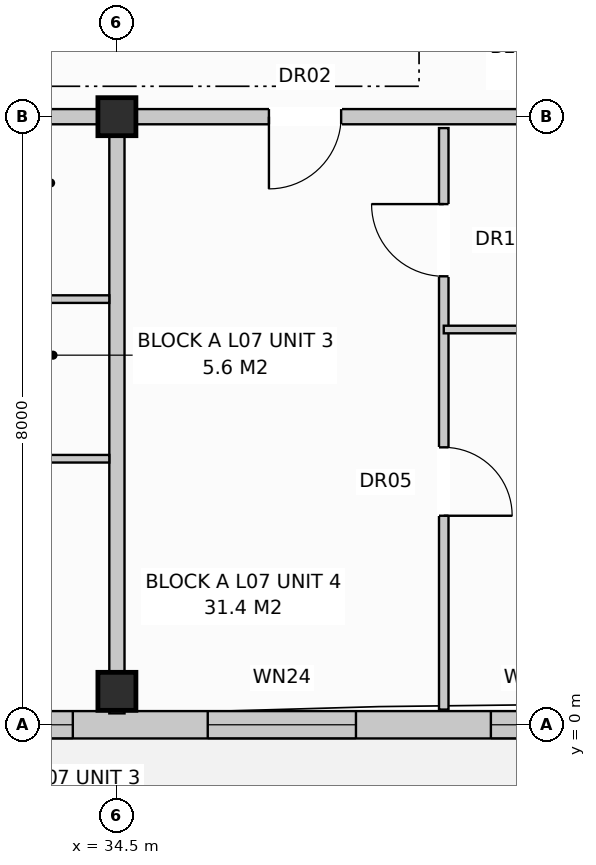
"""IFC4 building model, lengths in metres.
Left out: names, types, materials, properties, quantities, classifications, styles, units other than length and angle.
Written with IfcOpenShell. Run it as: python <this file> out.ifc"""

import sys

from ifc_helpers import new_model, si_unit, direction, frame, frame_2d, origin, origin_with_axes, origin_2d, place, context, subcontext, project, spatial, rectangle, extrude, element, fill, save


model = new_model("IFC4")
c1 = context("Model", 3, precision=1e-05, world=origin(), true_north=direction((0.0, 1.0)))
c2 = subcontext(c1, "Body", "Model", "MODEL_VIEW")
j1 = project(units=[si_unit("LENGTHUNIT", "METRE"), si_unit("PLANEANGLEUNIT", "RADIAN")], contexts=[c1])
p1 = place(None, origin())
s1 = spatial("IfcSite", under=j1, at=p1, CompositionType="ELEMENT")
p2 = place(p1, origin())
s2 = spatial("IfcBuilding", under=s1, at=p2, CompositionType="ELEMENT")
p3 = place(p2, frame((0.0, 0.0, 24.0)))
s3 = spatial("IfcBuildingStorey", under=s2, at=p3, CompositionType="ELEMENT", Elevation=24.0)
for number, where, z_axis, x_axis in (
    (1, (34.5, 0.44, 0.0), (0.0, 0.0, 1.0), (1.0, 0.0, 0.0)),
    (2, (34.5, 8.0, 0.0), (0.0, 0.0, 1.0), (1.0, 0.0, 0.0)),
):
    element("IfcColumn", number, at=place(p3, frame(where, z_axis=z_axis, x_axis=x_axis)), inside=s3, PredefinedType="COLUMN", context=c2, shape_type="SweptSolid", body=[
        extrude(rectangle(XDim=0.5, YDim=0.5, at=origin_2d()), origin(), (0.0, 0.0, 1.0), 3.2),
    ])
p4 = place(p3, frame((0.17, 0.0, 0.0), z_axis=(0.0, 0.0, 1.0), x_axis=(1.0, 0.0, 0.0)))
e3 = element("IfcWall", 3, at=p4, inside=s3, PredefinedType="STANDARD", context=c2, shape_type="SweptSolid", body=[
    extrude(rectangle(XDim=54.86, YDim=0.36, at=frame_2d((27.43, 0.0))), origin(), (0.0, 0.0, 1.0), 2.95),
])
p5 = place(p4, frame((2.5, 0.0, 0.0)))
e4 = element("IfcOpeningElement", 4, at=p5, cuts=e3, PredefinedType="OPENING", context=c2, shape_type="SweptSolid", body=[
    extrude(rectangle(XDim=0.95, YDim=2.1, at=frame_2d((0.475, 1.05))), frame((0.0, 0.192, 0.0), z_axis=(0.0, -1.0, 0.0), x_axis=(1.0, 0.0, 0.0)), (0.0, 0.0, 1.0), 0.384),
])
p6 = place(p4, frame((17.0, 0.0, 0.0)))
e5 = element("IfcOpeningElement", 5, at=p6, cuts=e3, PredefinedType="OPENING", context=c2, shape_type="SweptSolid", body=[
    extrude(rectangle(XDim=0.95, YDim=2.1, at=frame_2d((0.475, 1.05))), frame((0.0, 0.192, 0.0), z_axis=(0.0, -1.0, 0.0), x_axis=(1.0, 0.0, 0.0)), (0.0, 0.0, 1.0), 0.384),
])
p7 = place(p4, frame((30.1, 0.0, 0.0)))
e6 = element("IfcOpeningElement", 6, at=p7, cuts=e3, PredefinedType="OPENING", context=c2, shape_type="SweptSolid", body=[
    extrude(rectangle(XDim=0.95, YDim=2.1, at=frame_2d((0.475, 1.05))), frame((0.0, 0.192, 0.0), z_axis=(0.0, -1.0, 0.0), x_axis=(1.0, 0.0, 0.0)), (0.0, 0.0, 1.0), 0.384),
])
p8 = place(p4, frame((46.5, 0.0, 0.0)))
e7 = element("IfcOpeningElement", 7, at=p8, cuts=e3, PredefinedType="OPENING", context=c2, shape_type="SweptSolid", body=[
    extrude(rectangle(XDim=0.95, YDim=2.1, at=frame_2d((0.475, 1.05))), frame((0.0, 0.192, 0.0), z_axis=(0.0, -1.0, 0.0), x_axis=(1.0, 0.0, 0.0)), (0.0, 0.0, 1.0), 0.384),
])
p9 = place(p4, frame((0.75, 0.0, 0.72)))
e8 = element("IfcOpeningElement", 8, at=p9, cuts=e3, PredefinedType="OPENING", context=c2, shape_type="SweptSolid", body=[
    extrude(rectangle(XDim=1.1, YDim=1.5, at=frame_2d((0.55, 0.75))), frame((0.0, 0.192, 0.0), z_axis=(0.0, -1.0, 0.0), x_axis=(1.0, 0.0, 0.0)), (0.0, 0.0, 1.0), 0.384),
])
p10 = place(p4, frame((4.25, 0.0, 0.72)))
e9 = element("IfcOpeningElement", 9, at=p10, cuts=e3, PredefinedType="OPENING", context=c2, shape_type="SweptSolid", body=[
    extrude(rectangle(XDim=1.9, YDim=1.85, at=frame_2d((0.95, 0.925))), frame((0.0, 0.192, 0.0), z_axis=(0.0, -1.0, 0.0), x_axis=(1.0, 0.0, 0.0)), (0.0, 0.0, 1.0), 0.384),
])
p11 = place(p4, frame((8.925, 0.0, 0.8)))
e10 = element("IfcOpeningElement", 10, at=p11, cuts=e3, PredefinedType="OPENING", context=c2, shape_type="SweptSolid", body=[
    extrude(rectangle(XDim=1.95, YDim=1.65, at=frame_2d((0.975, 0.825))), frame((0.0, 0.192, 0.0), z_axis=(0.0, -1.0, 0.0), x_axis=(1.0, 0.0, 0.0)), (0.0, 0.0, 1.0), 0.384),
])
p12 = place(p4, frame((15.05, 0.0, 0.72)))
e11 = element("IfcOpeningElement", 11, at=p12, cuts=e3, PredefinedType="OPENING", context=c2, shape_type="SweptSolid", body=[
    extrude(rectangle(XDim=1.1, YDim=1.5, at=frame_2d((0.55, 0.75))), frame((0.0, 0.192, 0.0), z_axis=(0.0, -1.0, 0.0), x_axis=(1.0, 0.0, 0.0)), (0.0, 0.0, 1.0), 0.384),
])
p13 = place(p4, frame((21.05, 0.0, 0.72)))
e12 = element("IfcOpeningElement", 12, at=p13, cuts=e3, PredefinedType="OPENING", context=c2, shape_type="SweptSolid", body=[
    extrude(rectangle(XDim=1.9, YDim=1.85, at=frame_2d((0.95, 0.925))), frame((0.0, 0.192, 0.0), z_axis=(0.0, -1.0, 0.0), x_axis=(1.0, 0.0, 0.0)), (0.0, 0.0, 1.0), 0.384),
])
p14 = place(p4, frame((24.85, 0.0, 0.72)))
e13 = element("IfcOpeningElement", 13, at=p14, cuts=e3, PredefinedType="OPENING", context=c2, shape_type="SweptSolid", body=[
    extrude(rectangle(XDim=1.1, YDim=1.5, at=frame_2d((0.55, 0.75))), frame((0.0, 0.192, 0.0), z_axis=(0.0, -1.0, 0.0), x_axis=(1.0, 0.0, 0.0)), (0.0, 0.0, 1.0), 0.384),
])
p15 = place(p4, frame((28.35, 0.0, 0.72)))
e14 = element("IfcOpeningElement", 14, at=p15, cuts=e3, PredefinedType="OPENING", context=c2, shape_type="SweptSolid", body=[
    extrude(rectangle(XDim=1.1, YDim=1.5, at=frame_2d((0.55, 0.75))), frame((0.0, 0.192, 0.0), z_axis=(0.0, -1.0, 0.0), x_axis=(1.0, 0.0, 0.0)), (0.0, 0.0, 1.0), 0.384),
])
p16 = place(p4, frame((31.85, 0.0, 0.72)))
e15 = element("IfcOpeningElement", 15, at=p16, cuts=e3, PredefinedType="OPENING", context=c2, shape_type="SweptSolid", body=[
    extrude(rectangle(XDim=1.9, YDim=1.85, at=frame_2d((0.95, 0.925))), frame((0.0, 0.192, 0.0), z_axis=(0.0, -1.0, 0.0), x_axis=(1.0, 0.0, 0.0)), (0.0, 0.0, 1.0), 0.384),
])
p17 = place(p4, frame((35.525, 0.0, 0.8)))
e16 = element("IfcOpeningElement", 16, at=p17, cuts=e3, PredefinedType="OPENING", context=c2, shape_type="SweptSolid", body=[
    extrude(rectangle(XDim=1.95, YDim=1.65, at=frame_2d((0.975, 0.825))), frame((0.0, 0.192, 0.0), z_axis=(0.0, -1.0, 0.0), x_axis=(1.0, 0.0, 0.0)), (0.0, 0.0, 1.0), 0.384),
])
p18 = place(p4, frame((39.25, 0.0, 0.72)))
e17 = element("IfcOpeningElement", 17, at=p18, cuts=e3, PredefinedType="OPENING", context=c2, shape_type="SweptSolid", body=[
    extrude(rectangle(XDim=1.1, YDim=1.5, at=frame_2d((0.55, 0.75))), frame((0.0, 0.192, 0.0), z_axis=(0.0, -1.0, 0.0), x_axis=(1.0, 0.0, 0.0)), (0.0, 0.0, 1.0), 0.384),
])
p19 = place(p4, frame((42.45, 0.0, 0.8)))
e18 = element("IfcOpeningElement", 18, at=p19, cuts=e3, PredefinedType="OPENING", context=c2, shape_type="SweptSolid", body=[
    extrude(rectangle(XDim=1.9, YDim=1.85, at=frame_2d((0.95, 0.925))), frame((0.0, 0.192, 0.0), z_axis=(0.0, -1.0, 0.0), x_axis=(1.0, 0.0, 0.0)), (0.0, 0.0, 1.0), 0.384),
])
p20 = place(p4, frame((48.7, 0.0, 0.9)))
e19 = element("IfcOpeningElement", 19, at=p20, cuts=e3, PredefinedType="OPENING", context=c2, shape_type="SweptSolid", body=[
    extrude(rectangle(XDim=0.95, YDim=1.55, at=frame_2d((0.475, 0.775))), frame((0.0, 0.192, 0.0), z_axis=(0.0, -1.0, 0.0), x_axis=(1.0, 0.0, 0.0)), (0.0, 0.0, 1.0), 0.384),
])
p21 = place(p4, frame((51.5, 0.0, 0.8)))
e20 = element("IfcOpeningElement", 20, at=p21, cuts=e3, PredefinedType="OPENING", context=c2, shape_type="SweptSolid", body=[
    extrude(rectangle(XDim=1.8, YDim=1.7, at=frame_2d((0.9, 0.85))), frame((0.0, 0.192, 0.0), z_axis=(0.0, -1.0, 0.0), x_axis=(1.0, 0.0, 0.0)), (0.0, 0.0, 1.0), 0.384),
])
p22 = place(p3, frame((34.5, 7.85, 0.0), z_axis=(0.0, 0.0, 1.0), x_axis=(0.0, -1.0, 0.0)))
e21 = element("IfcWall", 21, at=p22, inside=s3, PredefinedType="PARTITIONING", context=c2, shape_type="SweptSolid", body=[
    extrude(rectangle(XDim=7.7, YDim=0.2, at=frame_2d((3.85, 0.0))), origin(), (0.0, 0.0, 1.0), 2.95),
])
p23 = place(p3, frame((27.6, 8.0, 0.0), z_axis=(0.0, 0.0, 1.0), x_axis=(1.0, 0.0, 0.0)))
e22 = element("IfcWall", 22, at=p23, inside=s3, PredefinedType="PARTITIONING", context=c2, shape_type="SweptSolid", body=[
    extrude(rectangle(XDim=6.9, YDim=0.2, at=frame_2d((3.45, 0.0))), origin(), (0.0, 0.0, 1.0), 2.39),
])
p24 = place(p23, frame((2.0, 0.0, 0.0)))
e23 = element("IfcOpeningElement", 23, at=p24, cuts=e22, PredefinedType="OPENING", context=c2, shape_type="SweptSolid", body=[
    extrude(rectangle(XDim=0.95, YDim=2.15, at=frame_2d((0.475, 1.075))), frame((0.0, 0.112, 0.0), z_axis=(0.0, -1.0, 0.0), x_axis=(1.0, 0.0, 0.0)), (0.0, 0.0, 1.0), 0.224),
])
for number, where, z_axis, x_axis in (
    (24, (31.5, 5.6, 0.0), (0.0, 0.0, 1.0), (1.0, 0.0, 0.0)),
    (25, (31.5, 3.5, 0.0), (0.0, 0.0, 1.0), (1.0, 0.0, 0.0)),
):
    element("IfcWall", number, at=place(p3, frame(where, z_axis=z_axis, x_axis=x_axis)), inside=s3, PredefinedType="PARTITIONING", context=c2, shape_type="SweptSolid", body=[
        extrude(rectangle(XDim=2.9, YDim=0.1, at=frame_2d((1.45, 0.0))), origin(), (0.0, 0.0, 1.0), 2.95),
    ])
p25 = place(p3, frame((34.5, 8.0, 0.0), z_axis=(0.0, 0.0, 1.0), x_axis=(1.0, 0.0, 0.0)))
e26 = element("IfcWall", 26, at=p25, inside=s3, PredefinedType="PARTITIONING", context=c2, shape_type="SweptSolid", body=[
    extrude(rectangle(XDim=6.9, YDim=0.2, at=frame_2d((3.45, 0.0))), origin(), (0.0, 0.0, 1.0), 2.39),
])
p26 = place(p25, frame((2.0, 0.0, 0.0)))
e27 = element("IfcOpeningElement", 27, at=p26, cuts=e26, PredefinedType="OPENING", context=c2, shape_type="SweptSolid", body=[
    extrude(rectangle(XDim=0.95, YDim=2.15, at=frame_2d((0.475, 1.075))), frame((0.0, 0.112, 0.0), z_axis=(0.0, -1.0, 0.0), x_axis=(1.0, 0.0, 0.0)), (0.0, 0.0, 1.0), 0.224),
])
p27 = place(p3, frame((38.8, 7.85, 0.0), z_axis=(0.0, 0.0, 1.0), x_axis=(0.0, -1.0, 0.0)))
e28 = element("IfcWall", 28, at=p27, inside=s3, PredefinedType="PARTITIONING", context=c2, shape_type="SweptSolid", body=[
    extrude(rectangle(XDim=7.65, YDim=0.125, at=frame_2d((3.825, 0.0))), origin(), (0.0, 0.0, 1.0), 2.95),
])
p28 = place(p27, frame((1.0, 0.0, 0.0)))
e29 = element("IfcOpeningElement", 29, at=p28, cuts=e28, PredefinedType="OPENING", context=c2, shape_type="SweptSolid", body=[
    extrude(rectangle(XDim=0.95, YDim=2.1, at=frame_2d((0.475, 1.05))), frame((0.0, 0.074, 0.0), z_axis=(0.0, -1.0, 0.0), x_axis=(1.0, 0.0, 0.0)), (0.0, 0.0, 1.0), 0.149),
])
p29 = place(p27, frame((4.2, 0.0, 0.0)))
e30 = element("IfcOpeningElement", 30, at=p29, cuts=e28, PredefinedType="OPENING", context=c2, shape_type="SweptSolid", body=[
    extrude(rectangle(XDim=0.9, YDim=2.1, at=frame_2d((0.45, 1.05))), frame((0.0, 0.074, 0.0), z_axis=(0.0, -1.0, 0.0), x_axis=(1.0, 0.0, 0.0)), (0.0, 0.0, 1.0), 0.149),
])
p30 = place(p3, frame((38.8, 5.2, 0.0), z_axis=(0.0, 0.0, 1.0), x_axis=(1.0, 0.0, 0.0)))
e31 = element("IfcWall", 31, at=p30, inside=s3, PredefinedType="PARTITIONING", context=c2, shape_type="SweptSolid", body=[
    extrude(rectangle(XDim=2.5, YDim=0.1, at=frame_2d((1.25, 0.0))), origin(), (0.0, 0.0, 1.0), 2.95),
])
p31 = place(p16, origin_with_axes())
e32 = element("IfcWindow", 32, at=p31, inside=s3, PartitioningType="SINGLE_PANEL", PredefinedType="WINDOW", context=c2, shape_type="SweptSolid", body=[
    extrude(rectangle(XDim=1.9, YDim=1.85, at=frame_2d((0.95, 0.925))), frame((0.0, 0.03, 0.0), z_axis=(0.0, -1.0, 0.0), x_axis=(1.0, 0.0, 0.0)), (0.0, 0.0, 1.0), 0.06),
])
fill(e15, e32)
p32 = place(p17, origin_with_axes())
e33 = element("IfcWindow", 33, at=p32, inside=s3, PartitioningType="SINGLE_PANEL", PredefinedType="WINDOW", context=c2, shape_type="SweptSolid", body=[
    extrude(rectangle(XDim=1.95, YDim=1.65, at=frame_2d((0.975, 0.825))), frame((0.0, 0.03, 0.0), z_axis=(0.0, -1.0, 0.0), x_axis=(1.0, 0.0, 0.0)), (0.0, 0.0, 1.0), 0.06),
])
fill(e16, e33)
p33 = place(p18, origin_with_axes())
e34 = element("IfcWindow", 34, at=p33, inside=s3, PartitioningType="SINGLE_PANEL", PredefinedType="WINDOW", context=c2, shape_type="SweptSolid", body=[
    extrude(rectangle(XDim=1.1, YDim=1.5, at=frame_2d((0.55, 0.75))), frame((0.0, 0.03, 0.0), z_axis=(0.0, -1.0, 0.0), x_axis=(1.0, 0.0, 0.0)), (0.0, 0.0, 1.0), 0.06),
])
fill(e17, e34)
p34 = place(p26, frame((0.95, 0.0, 0.0), z_axis=(0.0, 0.0, 1.0), x_axis=(-1.0, 0.0, 0.0)))
e35 = element("IfcDoor", 35, at=p34, inside=s3, OperationType="SINGLE_SWING_LEFT", PredefinedType="DOOR", context=c2, shape_type="SweptSolid", body=[
    extrude(rectangle(XDim=0.95, YDim=2.15, at=frame_2d((0.475, 1.075))), frame((0.0, 0.025, 0.0), z_axis=(0.0, -1.0, 0.0), x_axis=(1.0, 0.0, 0.0)), (0.0, 0.0, 1.0), 0.05),
])
fill(e27, e35)
p35 = place(p28, frame((0.95, 0.0, 0.0), z_axis=(0.0, 0.0, 1.0), x_axis=(-1.0, 0.0, 0.0)))
e36 = element("IfcDoor", 36, at=p35, inside=s3, OperationType="SINGLE_SWING_LEFT", PredefinedType="DOOR", context=c2, shape_type="SweptSolid", body=[
    extrude(rectangle(XDim=0.95, YDim=2.1, at=frame_2d((0.475, 1.05))), frame((0.0, 0.025, 0.0), z_axis=(0.0, -1.0, 0.0), x_axis=(1.0, 0.0, 0.0)), (0.0, 0.0, 1.0), 0.05),
])
fill(e29, e36)
p36 = place(p29, origin_with_axes())
e37 = element("IfcDoor", 37, at=p36, inside=s3, OperationType="SINGLE_SWING_RIGHT", PredefinedType="DOOR", context=c2, shape_type="SweptSolid", body=[
    extrude(rectangle(XDim=0.9, YDim=2.1, at=frame_2d((0.45, 1.05))), frame((0.0, 0.025, 0.0), z_axis=(0.0, -1.0, 0.0), x_axis=(1.0, 0.0, 0.0)), (0.0, 0.0, 1.0), 0.05),
])
fill(e30, e37)
save(model, sys.argv[1])
